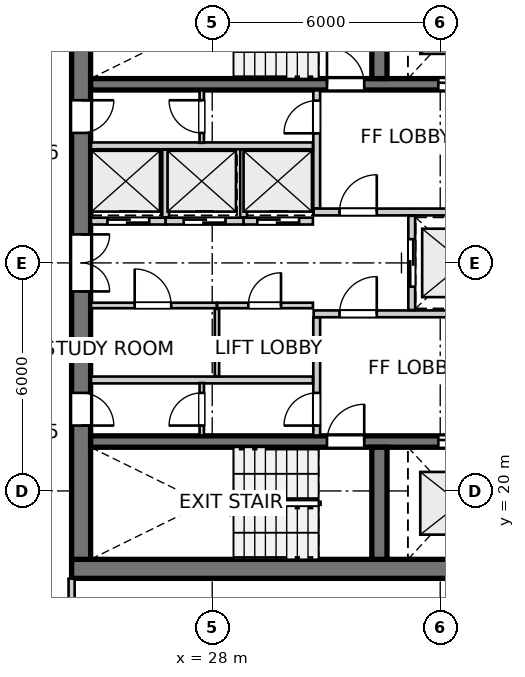
"""IFC4 building model, lengths in metres.
Left out: names, types, materials, properties, quantities, classifications, styles, units other than length and angle.
Written with IfcOpenShell. Run it as: python <this file> out.ifc"""

import sys

from ifc_helpers import new_model, si_unit, direction, frame, frame_2d, origin, place, context, subcontext, project, spatial, rectangle, extrude, source, transform, mapped, element, fill, save


model = new_model("IFC4")
c1 = context("Model", 3, precision=1e-05, world=origin(), true_north=direction((0.0, 1.0)))
c2 = subcontext(c1, "Body", "Model", "MODEL_VIEW")
j1 = project(units=[si_unit("LENGTHUNIT", "METRE"), si_unit("PLANEANGLEUNIT", "RADIAN")], contexts=[c1])
p1 = place(None, origin())
s1 = spatial("IfcSite", under=j1, at=p1, CompositionType="ELEMENT")
p2 = place(p1, origin())
s2 = spatial("IfcBuilding", under=s1, at=p2, CompositionType="ELEMENT")
p3 = place(p2, frame((0.0, 0.0, 208.4)))
s3 = spatial("IfcBuildingStorey", under=s2, at=p3, CompositionType="ELEMENT", Elevation=208.4)
p4 = place(p3, frame((24.3, 17.95, 0.0), z_axis=(0.0, 0.0, 1.0), x_axis=(1.0, 0.0, 0.0)))
e1 = element("IfcWall", 1, at=p4, inside=s3, PredefinedType="SHEAR", context=c2, shape_type="SweptSolid", body=[
    extrude(rectangle(XDim=12.1, YDim=0.5, at=frame_2d((6.05, 0.0))), origin(), (0.0, 0.0, 1.0), 2.935),
])
p5 = place(p3, frame((24.55, 33.8, 0.0), z_axis=(0.0, 0.0, 1.0), x_axis=(0.0, -1.0, 0.0)))
e2 = element("IfcWall", 2, at=p5, inside=s3, PredefinedType="SHEAR", context=c2, shape_type="SweptSolid", body=[
    extrude(rectangle(XDim=15.6, YDim=0.5, at=frame_2d((7.8, 0.0))), origin(), (0.0, 0.0, 1.0), 2.935),
])
p6 = place(p5, frame((7.05, 0.0, 0.0)))
e3 = element("IfcOpeningElement", 3, at=p6, cuts=e2, PredefinedType="OPENING", context=c2, shape_type="SweptSolid", body=[
    extrude(rectangle(XDim=1.5, YDim=2.15, at=frame_2d((0.75, 1.075))), frame((0.0, 0.26, 0.0), z_axis=(0.0, -1.0, 0.0), x_axis=(1.0, 0.0, 0.0)), (0.0, 0.0, 1.0), 0.52),
])
p7 = place(p5, frame((3.52, 0.0, 0.0)))
e4 = element("IfcOpeningElement", 4, at=p7, cuts=e2, PredefinedType="OPENING", context=c2, shape_type="SweptSolid", body=[
    extrude(rectangle(XDim=0.86, YDim=2.05, at=frame_2d((0.43, 1.025))), frame((0.0, 0.26, 0.0), z_axis=(0.0, -1.0, 0.0), x_axis=(1.0, 0.0, 0.0)), (0.0, 0.0, 1.0), 0.52),
])
p8 = place(p5, frame((11.22, 0.0, 0.0)))
e5 = element("IfcOpeningElement", 5, at=p8, cuts=e2, PredefinedType="OPENING", context=c2, shape_type="SweptSolid", body=[
    extrude(rectangle(XDim=0.86, YDim=2.05, at=frame_2d((0.43, 1.025))), frame((0.0, 0.26, 0.0), z_axis=(0.0, -1.0, 0.0), x_axis=(1.0, 0.0, 0.0)), (0.0, 0.0, 1.0), 0.52),
])
p9 = place(p3, frame((24.8, 21.3, 0.0), z_axis=(0.0, 0.0, 1.0), x_axis=(1.0, 0.0, 0.0)))
e6 = element("IfcWall", 6, at=p9, inside=s3, PredefinedType="SHEAR", context=c2, shape_type="SweptSolid", body=[
    extrude(rectangle(XDim=11.1, YDim=0.3, at=frame_2d((5.55, 0.0))), origin(), (0.0, 0.0, 1.0), 2.935),
])
p10 = place(p9, frame((6.22, 0.0, 0.0)))
e7 = element("IfcOpeningElement", 7, at=p10, cuts=e6, PredefinedType="OPENING", context=c2, shape_type="SweptSolid", body=[
    extrude(rectangle(XDim=0.98, YDim=2.15, at=frame_2d((0.49, 1.075))), frame((0.0, 0.16, 0.0), z_axis=(0.0, -1.0, 0.0), x_axis=(1.0, 0.0, 0.0)), (0.0, 0.0, 1.0), 0.32),
])
p11 = place(p9, frame((9.15, 0.0, 0.0)))
e8 = element("IfcOpeningElement", 8, at=p11, cuts=e6, PredefinedType="OPENING", context=c2, shape_type="SweptSolid", body=[
    extrude(rectangle(XDim=1.15, YDim=2.15, at=frame_2d((0.575, 1.075))), frame((0.0, 0.16, 0.0), z_axis=(0.0, -1.0, 0.0), x_axis=(1.0, 0.0, 0.0)), (0.0, 0.0, 1.0), 0.32),
])
p12 = place(p3, frame((32.4, 18.2, 0.0), z_axis=(0.0, 0.0, 1.0), x_axis=(0.0, 1.0, 0.0)))
e9 = element("IfcWall", 9, at=p12, inside=s3, PredefinedType="SHEAR", context=c2, shape_type="SweptSolid", body=[
    extrude(rectangle(XDim=2.95, YDim=0.4, at=frame_2d((1.475, 0.0))), origin(), (0.0, 0.0, 1.0), 2.935),
])
p13 = place(p3, frame((24.8, 30.7, 0.0), z_axis=(0.0, 0.0, 1.0), x_axis=(1.0, 0.0, 0.0)))
e10 = element("IfcWall", 10, at=p13, inside=s3, PredefinedType="SHEAR", context=c2, shape_type="SweptSolid", body=[
    extrude(rectangle(XDim=11.1, YDim=0.3, at=frame_2d((5.55, 0.0))), origin(), (0.0, 0.0, 1.0), 2.935),
])
p14 = place(p13, frame((6.22, 0.0, 0.0)))
e11 = element("IfcOpeningElement", 11, at=p14, cuts=e10, PredefinedType="OPENING", context=c2, shape_type="SweptSolid", body=[
    extrude(rectangle(XDim=0.98, YDim=2.15, at=frame_2d((0.49, 1.075))), frame((0.0, 0.16, 0.0), z_axis=(0.0, -1.0, 0.0), x_axis=(1.0, 0.0, 0.0)), (0.0, 0.0, 1.0), 0.32),
])
p15 = place(p13, frame((9.15, 0.0, 0.0)))
e12 = element("IfcOpeningElement", 12, at=p15, cuts=e10, PredefinedType="OPENING", context=c2, shape_type="SweptSolid", body=[
    extrude(rectangle(XDim=1.15, YDim=2.15, at=frame_2d((0.575, 1.075))), frame((0.0, 0.16, 0.0), z_axis=(0.0, -1.0, 0.0), x_axis=(1.0, 0.0, 0.0)), (0.0, 0.0, 1.0), 0.32),
])
p16 = place(p3, frame((32.4, 30.85, 0.0), z_axis=(0.0, 0.0, 1.0), x_axis=(0.0, 1.0, 0.0)))
e13 = element("IfcWall", 13, at=p16, inside=s3, PredefinedType="SHEAR", context=c2, shape_type="SweptSolid", body=[
    extrude(rectangle(XDim=2.95, YDim=0.4, at=frame_2d((1.475, 0.0))), origin(), (0.0, 0.0, 1.0), 2.935),
])
p17 = place(p3, frame((30.75, 21.46, 0.0), z_axis=(0.0, 0.0, 1.0), x_axis=(0.0, 1.0, 0.0)))
e14 = element("IfcWall", 14, at=p17, inside=s3, PredefinedType="PARTITIONING", context=c2, shape_type="SweptSolid", body=[
    extrude(rectangle(XDim=3.11, YDim=0.18, at=frame_2d((1.555, 0.0))), origin(), (0.0, 0.0, 1.0), 2.935),
])
p18 = place(p17, frame((0.26, 0.0, 0.0)))
e15 = element("IfcOpeningElement", 15, at=p18, cuts=e14, PredefinedType="OPENING", context=c2, shape_type="SweptSolid", body=[
    extrude(rectangle(XDim=0.86, YDim=2.05, at=frame_2d((0.43, 1.025))), frame((0.0, 0.1, 0.0), z_axis=(0.0, -1.0, 0.0), x_axis=(1.0, 0.0, 0.0)), (0.0, 0.0, 1.0), 0.2),
])
p19 = place(p3, frame((30.67, 24.66, 0.0), z_axis=(0.0, 0.0, 1.0), x_axis=(1.0, 0.0, 0.0)))
e16 = element("IfcWall", 16, at=p19, inside=s3, PredefinedType="PARTITIONING", context=c2, shape_type="SweptSolid", body=[
    extrude(rectangle(XDim=5.22, YDim=0.18, at=frame_2d((2.61, 0.0))), origin(), (0.0, 0.0, 1.0), 2.935),
])
p20 = place(p19, frame((0.68, 0.0, 0.0)))
e17 = element("IfcOpeningElement", 17, at=p20, cuts=e16, PredefinedType="OPENING", context=c2, shape_type="SweptSolid", body=[
    extrude(rectangle(XDim=0.98, YDim=2.15, at=frame_2d((0.49, 1.075))), frame((0.0, 0.1, 0.0), z_axis=(0.0, -1.0, 0.0), x_axis=(1.0, 0.0, 0.0)), (0.0, 0.0, 1.0), 0.2),
])
p21 = place(p3, frame((30.75, 27.43, 0.0), z_axis=(0.0, 0.0, 1.0), x_axis=(0.0, 1.0, 0.0)))
e18 = element("IfcWall", 18, at=p21, inside=s3, PredefinedType="PARTITIONING", context=c2, shape_type="SweptSolid", body=[
    extrude(rectangle(XDim=3.11, YDim=0.18, at=frame_2d((1.555, 0.0))), origin(), (0.0, 0.0, 1.0), 2.935),
])
p22 = place(p21, frame((1.98, 0.0, 0.0)))
e19 = element("IfcOpeningElement", 19, at=p22, cuts=e18, PredefinedType="OPENING", context=c2, shape_type="SweptSolid", body=[
    extrude(rectangle(XDim=0.86, YDim=2.05, at=frame_2d((0.43, 1.025))), frame((0.0, 0.1, 0.0), z_axis=(0.0, -1.0, 0.0), x_axis=(1.0, 0.0, 0.0)), (0.0, 0.0, 1.0), 0.2),
])
p23 = place(p3, frame((30.67, 27.34, 0.0), z_axis=(0.0, 0.0, 1.0), x_axis=(1.0, 0.0, 0.0)))
e20 = element("IfcWall", 20, at=p23, inside=s3, PredefinedType="PARTITIONING", context=c2, shape_type="SweptSolid", body=[
    extrude(rectangle(XDim=5.22, YDim=0.18, at=frame_2d((2.61, 0.0))), origin(), (0.0, 0.0, 1.0), 2.935),
])
p24 = place(p23, frame((0.68, 0.0, 0.0)))
e21 = element("IfcOpeningElement", 21, at=p24, cuts=e20, PredefinedType="OPENING", context=c2, shape_type="SweptSolid", body=[
    extrude(rectangle(XDim=0.98, YDim=2.15, at=frame_2d((0.49, 1.075))), frame((0.0, 0.1, 0.0), z_axis=(0.0, -1.0, 0.0), x_axis=(1.0, 0.0, 0.0)), (0.0, 0.0, 1.0), 0.2),
])
p25 = place(p3, frame((33.25, 24.76, 0.0), z_axis=(0.0, 0.0, 1.0), x_axis=(0.0, 1.0, 0.0)))
e22 = element("IfcWall", 22, at=p25, inside=s3, PredefinedType="PARTITIONING", context=c2, shape_type="SweptSolid", body=[
    extrude(rectangle(XDim=2.48, YDim=0.18, at=frame_2d((1.24, 0.0))), origin(), (0.0, 0.0, 1.0), 2.935),
])
p26 = place(p25, frame((0.615, 0.0, 0.0)))
e23 = element("IfcOpeningElement", 23, at=p26, cuts=e22, PredefinedType="OPENING", context=c2, shape_type="SweptSolid", body=[
    extrude(rectangle(XDim=1.25, YDim=2.15, at=frame_2d((0.625, 1.075))), frame((0.0, 0.1, 0.0), z_axis=(0.0, -1.0, 0.0), x_axis=(1.0, 0.0, 0.0)), (0.0, 0.0, 1.0), 0.2),
])
p27 = place(p3, frame((24.81, 22.92, 0.0), z_axis=(0.0, 0.0, 1.0), x_axis=(1.0, 0.0, 0.0)))
e24 = element("IfcWall", 24, at=p27, inside=s3, PredefinedType="PARTITIONING", context=c2, shape_type="SweptSolid", body=[
    extrude(rectangle(XDim=5.84, YDim=0.18, at=frame_2d((2.92, 0.0))), origin(), (0.0, 0.0, 1.0), 2.935),
])
p28 = place(p3, frame((24.81, 24.88, 0.0), z_axis=(0.0, 0.0, 1.0), x_axis=(1.0, 0.0, 0.0)))
e25 = element("IfcWall", 25, at=p28, inside=s3, PredefinedType="PARTITIONING", context=c2, shape_type="SweptSolid", body=[
    extrude(rectangle(XDim=3.31, YDim=0.145, at=frame_2d((1.655, 0.0))), origin(), (0.0, 0.0, 1.0), 2.935),
])
p29 = place(p28, frame((1.15, 0.0, 0.0)))
e26 = element("IfcOpeningElement", 26, at=p29, cuts=e25, PredefinedType="OPENING", context=c2, shape_type="SweptSolid", body=[
    extrude(rectangle(XDim=0.96, YDim=2.1, at=frame_2d((0.48, 1.05))), frame((0.0, 0.083, 0.0), z_axis=(0.0, -1.0, 0.0), x_axis=(1.0, 0.0, 0.0)), (0.0, 0.0, 1.0), 0.165),
])
p30 = place(p3, frame((28.13, 24.88, 0.0), z_axis=(0.0, 0.0, 1.0), x_axis=(1.0, 0.0, 0.0)))
e27 = element("IfcWall", 27, at=p30, inside=s3, PredefinedType="PARTITIONING", context=c2, shape_type="SweptSolid", body=[
    extrude(rectangle(XDim=2.52, YDim=0.145, at=frame_2d((1.26, 0.0))), origin(), (0.0, 0.0, 1.0), 2.935),
])
p31 = place(p30, frame((0.82, 0.0, 0.0)))
e28 = element("IfcOpeningElement", 28, at=p31, cuts=e27, PredefinedType="OPENING", context=c2, shape_type="SweptSolid", body=[
    extrude(rectangle(XDim=0.86, YDim=2.05, at=frame_2d((0.43, 1.025))), frame((0.0, 0.083, 0.0), z_axis=(0.0, -1.0, 0.0), x_axis=(1.0, 0.0, 0.0)), (0.0, 0.0, 1.0), 0.165),
])
p32 = place(p3, frame((28.125, 23.02, 0.0), z_axis=(0.0, 0.0, 1.0), x_axis=(0.0, 1.0, 0.0)))
e29 = element("IfcWall", 29, at=p32, inside=s3, PredefinedType="PARTITIONING", context=c2, shape_type="SweptSolid", body=[
    extrude(rectangle(XDim=1.77, YDim=0.115, at=frame_2d((0.885, 0.0))), origin(), (0.0, 0.0, 1.0), 2.935),
])
p33 = place(p3, frame((24.81, 29.08, 0.0), z_axis=(0.0, 0.0, 1.0), x_axis=(1.0, 0.0, 0.0)))
e30 = element("IfcWall", 30, at=p33, inside=s3, PredefinedType="PARTITIONING", context=c2, shape_type="SweptSolid", body=[
    extrude(rectangle(XDim=5.84, YDim=0.18, at=frame_2d((2.92, 0.0))), origin(), (0.0, 0.0, 1.0), 2.935),
])
p34 = place(p3, frame((24.81, 27.1, 0.0), z_axis=(0.0, 0.0, 1.0), x_axis=(1.0, 0.0, 0.0)))
e31 = element("IfcWall", 31, at=p34, inside=s3, PredefinedType="PARTITIONING", context=c2, shape_type="SweptSolid", body=[
    extrude(rectangle(XDim=1.965, YDim=0.18, at=frame_2d((0.982, 0.0))), origin(), (0.0, 0.0, 1.0), 2.935),
])
p35 = place(p34, frame((0.433, 0.0, 0.0)))
e32 = element("IfcOpeningElement", 32, at=p35, cuts=e31, PredefinedType="OPENING", context=c2, shape_type="SweptSolid", body=[
    extrude(rectangle(XDim=1.1, YDim=2.15, at=frame_2d((0.55, 1.075))), frame((0.0, 0.1, 0.0), z_axis=(0.0, -1.0, 0.0), x_axis=(1.0, 0.0, 0.0)), (0.0, 0.0, 1.0), 0.2),
])
p36 = place(p3, frame((26.775, 27.1, 0.0), z_axis=(0.0, 0.0, 1.0), x_axis=(1.0, 0.0, 0.0)))
e33 = element("IfcWall", 33, at=p36, inside=s3, PredefinedType="PARTITIONING", context=c2, shape_type="SweptSolid", body=[
    extrude(rectangle(XDim=2.05, YDim=0.18, at=frame_2d((1.025, 0.0))), origin(), (0.0, 0.0, 1.0), 2.935),
])
p37 = place(p36, frame((0.475, 0.0, 0.0)))
e34 = element("IfcOpeningElement", 34, at=p37, cuts=e33, PredefinedType="OPENING", context=c2, shape_type="SweptSolid", body=[
    extrude(rectangle(XDim=1.1, YDim=2.15, at=frame_2d((0.55, 1.075))), frame((0.0, 0.1, 0.0), z_axis=(0.0, -1.0, 0.0), x_axis=(1.0, 0.0, 0.0)), (0.0, 0.0, 1.0), 0.2),
])
p38 = place(p3, frame((26.775, 27.2, 0.0), z_axis=(0.0, 0.0, 1.0), x_axis=(0.0, 1.0, 0.0)))
e35 = element("IfcWall", 35, at=p38, inside=s3, PredefinedType="PARTITIONING", context=c2, shape_type="SweptSolid", body=[
    extrude(rectangle(XDim=1.78, YDim=0.18, at=frame_2d((0.89, 0.0))), origin(), (0.0, 0.0, 1.0), 2.935),
])
p39 = place(p3, frame((28.825, 27.1, 0.0), z_axis=(0.0, 0.0, 1.0), x_axis=(1.0, 0.0, 0.0)))
e36 = element("IfcWall", 36, at=p39, inside=s3, PredefinedType="PARTITIONING", context=c2, shape_type="SweptSolid", body=[
    extrude(rectangle(XDim=1.825, YDim=0.18, at=frame_2d((0.913, 0.0))), origin(), (0.0, 0.0, 1.0), 2.935),
])
p40 = place(p39, frame((0.363, 0.0, 0.0)))
e37 = element("IfcOpeningElement", 37, at=p40, cuts=e36, PredefinedType="OPENING", context=c2, shape_type="SweptSolid", body=[
    extrude(rectangle(XDim=1.1, YDim=2.15, at=frame_2d((0.55, 1.075))), frame((0.0, 0.1, 0.0), z_axis=(0.0, -1.0, 0.0), x_axis=(1.0, 0.0, 0.0)), (0.0, 0.0, 1.0), 0.2),
])
p41 = place(p3, frame((28.825, 27.2, 0.0), z_axis=(0.0, 0.0, 1.0), x_axis=(0.0, 1.0, 0.0)))
e38 = element("IfcWall", 38, at=p41, inside=s3, PredefinedType="PARTITIONING", context=c2, shape_type="SweptSolid", body=[
    extrude(rectangle(XDim=1.78, YDim=0.18, at=frame_2d((0.89, 0.0))), origin(), (0.0, 0.0, 1.0), 2.935),
])
p42 = place(p3, frame((27.725, 21.46, 0.0), z_axis=(0.0, 0.0, 1.0), x_axis=(0.0, 1.0, 0.0)))
e39 = element("IfcWall", 39, at=p42, inside=s3, PredefinedType="PARTITIONING", context=c2, shape_type="SweptSolid", body=[
    extrude(rectangle(XDim=1.38, YDim=0.115, at=frame_2d((0.69, 0.0))), origin(), (0.0, 0.0, 1.0), 2.935),
])
p43 = place(p42, frame((0.26, 0.0, 0.0)))
e40 = element("IfcOpeningElement", 40, at=p43, cuts=e39, PredefinedType="OPENING", context=c2, shape_type="SweptSolid", body=[
    extrude(rectangle(XDim=0.86, YDim=2.05, at=frame_2d((0.43, 1.025))), frame((0.0, 0.067, 0.0), z_axis=(0.0, -1.0, 0.0), x_axis=(1.0, 0.0, 0.0)), (0.0, 0.0, 1.0), 0.135),
])
p44 = place(p3, frame((27.725, 29.16, 0.0), z_axis=(0.0, 0.0, 1.0), x_axis=(0.0, 1.0, 0.0)))
e41 = element("IfcWall", 41, at=p44, inside=s3, PredefinedType="PARTITIONING", context=c2, shape_type="SweptSolid", body=[
    extrude(rectangle(XDim=1.38, YDim=0.115, at=frame_2d((0.69, 0.0))), origin(), (0.0, 0.0, 1.0), 2.935),
])
p45 = place(p44, frame((0.26, 0.0, 0.0)))
e42 = element("IfcOpeningElement", 42, at=p45, cuts=e41, PredefinedType="OPENING", context=c2, shape_type="SweptSolid", body=[
    extrude(rectangle(XDim=0.86, YDim=2.05, at=frame_2d((0.43, 1.025))), frame((0.0, 0.067, 0.0), z_axis=(0.0, -1.0, 0.0), x_axis=(1.0, 0.0, 0.0)), (0.0, 0.0, 1.0), 0.135),
])
p46 = place(p3, frame((24.3, 15.002, 0.0), z_axis=(0.0, 0.0, 1.0), x_axis=(0.0, 1.0, 0.0)))
e43 = element("IfcWall", 43, at=p46, inside=s3, PredefinedType="PARTITIONING", context=c2, shape_type="SweptSolid", body=[
    extrude(rectangle(XDim=2.69, YDim=0.16, at=frame_2d((1.345, 0.0))), origin(), (0.0, 0.0, 1.0), 2.935),
])
m1 = source(origin(), c2, "Body", "SweptSolid", [
    extrude(rectangle(XDim=0.98, YDim=2.15, at=frame_2d((0.49, 1.075))), frame((0.0, 0.025, 0.0), z_axis=(0.0, -1.0, 0.0), x_axis=(1.0, 0.0, 0.0)), (0.0, 0.0, 1.0), 0.05),
])
p47 = place(p10, origin())
e44 = element("IfcDoor", 44, at=p47, inside=s3, OperationType="SINGLE_SWING_RIGHT", PredefinedType="DOOR", context=c2, shape_type="MappedRepresentation", body=[
    mapped(m1, transform((0.0, 0.0, 0.0), x_axis=(1.0, 0.0, 0.0), y_axis=(0.0, 1.0, 0.0), z_axis=(0.0, 0.0, 1.0), scale=1.0)),
])
fill(e7, e44)
m2 = source(origin(), c2, "Body", "SweptSolid", [
    extrude(rectangle(XDim=1.15, YDim=2.15, at=frame_2d((0.575, 1.075))), frame((0.0, 0.025, 0.0), z_axis=(0.0, -1.0, 0.0), x_axis=(1.0, 0.0, 0.0)), (0.0, 0.0, 1.0), 0.05),
])
p48 = place(p11, origin())
e45 = element("IfcDoor", 45, at=p48, inside=s3, OperationType="DOUBLE_DOOR_SLIDING", PredefinedType="DOOR", context=c2, shape_type="MappedRepresentation", body=[
    mapped(m2, transform((0.0, 0.0, 0.0), x_axis=(1.0, 0.0, 0.0), y_axis=(0.0, 1.0, 0.0), z_axis=(0.0, 0.0, 1.0), scale=1.0)),
])
fill(e8, e45)
p49 = place(p14, origin())
e46 = element("IfcDoor", 46, at=p49, inside=s3, OperationType="SINGLE_SWING_LEFT", PredefinedType="DOOR", context=c2, shape_type="MappedRepresentation", body=[
    mapped(m1, transform((0.0, 0.0, 0.0), x_axis=(1.0, 0.0, 0.0), y_axis=(0.0, 1.0, 0.0), z_axis=(0.0, 0.0, 1.0), scale=1.0)),
])
fill(e11, e46)
p50 = place(p15, origin())
e47 = element("IfcDoor", 47, at=p50, inside=s3, OperationType="DOUBLE_DOOR_SLIDING", PredefinedType="DOOR", context=c2, shape_type="MappedRepresentation", body=[
    mapped(m2, transform((0.0, 0.0, 0.0), x_axis=(1.0, 0.0, 0.0), y_axis=(0.0, 1.0, 0.0), z_axis=(0.0, 0.0, 1.0), scale=1.0)),
])
fill(e12, e47)
m3 = source(origin(), c2, "Body", "SweptSolid", [
    extrude(rectangle(XDim=1.5, YDim=2.15, at=frame_2d((0.75, 1.075))), frame((0.0, 0.025, 0.0), z_axis=(0.0, -1.0, 0.0), x_axis=(1.0, 0.0, 0.0)), (0.0, 0.0, 1.0), 0.05),
])
p51 = place(p6, origin())
e48 = element("IfcDoor", 48, at=p51, inside=s3, OperationType="DOUBLE_DOOR_SINGLE_SWING", PredefinedType="DOOR", context=c2, shape_type="MappedRepresentation", body=[
    mapped(m3, transform((0.0, 0.0, 0.0), x_axis=(1.0, 0.0, 0.0), y_axis=(0.0, 1.0, 0.0), z_axis=(0.0, 0.0, 1.0), scale=1.0)),
])
fill(e3, e48)
m4 = source(origin(), c2, "Body", "SweptSolid", [
    extrude(rectangle(XDim=0.86, YDim=2.05, at=frame_2d((0.43, 1.025))), frame((0.0, 0.025, 0.0), z_axis=(0.0, -1.0, 0.0), x_axis=(1.0, 0.0, 0.0)), (0.0, 0.0, 1.0), 0.05),
])
p52 = place(p7, origin())
e49 = element("IfcDoor", 49, at=p52, inside=s3, OperationType="SINGLE_SWING_LEFT", PredefinedType="DOOR", context=c2, shape_type="MappedRepresentation", body=[
    mapped(m4, transform((0.0, 0.0, 0.0), x_axis=(1.0, 0.0, 0.0), y_axis=(0.0, 1.0, 0.0), z_axis=(0.0, 0.0, 1.0), scale=1.0)),
])
fill(e4, e49)
p53 = place(p8, origin())
e50 = element("IfcDoor", 50, at=p53, inside=s3, OperationType="SINGLE_SWING_RIGHT", PredefinedType="DOOR", context=c2, shape_type="MappedRepresentation", body=[
    mapped(m4, transform((0.0, 0.0, 0.0), x_axis=(1.0, 0.0, 0.0), y_axis=(0.0, 1.0, 0.0), z_axis=(0.0, 0.0, 1.0), scale=1.0)),
])
fill(e5, e50)
p54 = place(p18, origin())
e51 = element("IfcDoor", 51, at=p54, inside=s3, OperationType="SINGLE_SWING_LEFT", PredefinedType="DOOR", context=c2, shape_type="MappedRepresentation", body=[
    mapped(m4, transform((0.0, 0.0, 0.0), x_axis=(1.0, 0.0, 0.0), y_axis=(0.0, 1.0, 0.0), z_axis=(0.0, 0.0, 1.0), scale=1.0)),
])
fill(e15, e51)
p55 = place(p20, origin())
e52 = element("IfcDoor", 52, at=p55, inside=s3, OperationType="SINGLE_SWING_RIGHT", PredefinedType="DOOR", context=c2, shape_type="MappedRepresentation", body=[
    mapped(m1, transform((0.0, 0.0, 0.0), x_axis=(1.0, 0.0, 0.0), y_axis=(0.0, 1.0, 0.0), z_axis=(0.0, 0.0, 1.0), scale=1.0)),
])
fill(e17, e52)
p56 = place(p22, origin())
e53 = element("IfcDoor", 53, at=p56, inside=s3, OperationType="SINGLE_SWING_LEFT", PredefinedType="DOOR", context=c2, shape_type="MappedRepresentation", body=[
    mapped(m4, transform((0.0, 0.0, 0.0), x_axis=(1.0, 0.0, 0.0), y_axis=(0.0, 1.0, 0.0), z_axis=(0.0, 0.0, 1.0), scale=1.0)),
])
fill(e19, e53)
p57 = place(p24, origin())
e54 = element("IfcDoor", 54, at=p57, inside=s3, OperationType="SINGLE_SWING_RIGHT", PredefinedType="DOOR", context=c2, shape_type="MappedRepresentation", body=[
    mapped(m1, transform((0.0, 0.0, 0.0), x_axis=(1.0, 0.0, 0.0), y_axis=(0.0, 1.0, 0.0), z_axis=(0.0, 0.0, 1.0), scale=1.0)),
])
fill(e21, e54)
m5 = source(origin(), c2, "Body", "SweptSolid", [
    extrude(rectangle(XDim=1.25, YDim=2.15, at=frame_2d((0.625, 1.075))), frame((0.0, 0.025, 0.0), z_axis=(0.0, -1.0, 0.0), x_axis=(1.0, 0.0, 0.0)), (0.0, 0.0, 1.0), 0.05),
])
p58 = place(p26, origin())
e55 = element("IfcDoor", 55, at=p58, inside=s3, OperationType="DOUBLE_DOOR_SLIDING", PredefinedType="DOOR", context=c2, shape_type="MappedRepresentation", body=[
    mapped(m5, transform((0.0, 0.0, 0.0), x_axis=(1.0, 0.0, 0.0), y_axis=(0.0, 1.0, 0.0), z_axis=(0.0, 0.0, 1.0), scale=1.0)),
])
fill(e23, e55)
m6 = source(origin(), c2, "Body", "SweptSolid", [
    extrude(rectangle(XDim=0.96, YDim=2.1, at=frame_2d((0.48, 1.05))), frame((0.0, 0.025, 0.0), z_axis=(0.0, -1.0, 0.0), x_axis=(1.0, 0.0, 0.0)), (0.0, 0.0, 1.0), 0.05),
])
p59 = place(p29, origin())
e56 = element("IfcDoor", 56, at=p59, inside=s3, OperationType="SINGLE_SWING_LEFT", PredefinedType="DOOR", context=c2, shape_type="MappedRepresentation", body=[
    mapped(m6, transform((0.0, 0.0, 0.0), x_axis=(1.0, 0.0, 0.0), y_axis=(0.0, 1.0, 0.0), z_axis=(0.0, 0.0, 1.0), scale=1.0)),
])
fill(e26, e56)
p60 = place(p31, origin())
e57 = element("IfcDoor", 57, at=p60, inside=s3, OperationType="SINGLE_SWING_RIGHT", PredefinedType="DOOR", context=c2, shape_type="MappedRepresentation", body=[
    mapped(m4, transform((0.0, 0.0, 0.0), x_axis=(1.0, 0.0, 0.0), y_axis=(0.0, 1.0, 0.0), z_axis=(0.0, 0.0, 1.0), scale=1.0)),
])
fill(e28, e57)
m7 = source(origin(), c2, "Body", "SweptSolid", [
    extrude(rectangle(XDim=1.1, YDim=2.15, at=frame_2d((0.55, 1.075))), frame((0.0, 0.025, 0.0), z_axis=(0.0, -1.0, 0.0), x_axis=(1.0, 0.0, 0.0)), (0.0, 0.0, 1.0), 0.05),
])
p61 = place(p35, origin())
e58 = element("IfcDoor", 58, at=p61, inside=s3, OperationType="DOUBLE_DOOR_SLIDING", PredefinedType="DOOR", context=c2, shape_type="MappedRepresentation", body=[
    mapped(m7, transform((0.0, 0.0, 0.0), x_axis=(1.0, 0.0, 0.0), y_axis=(0.0, 1.0, 0.0), z_axis=(0.0, 0.0, 1.0), scale=1.0)),
])
fill(e32, e58)
p62 = place(p37, origin())
e59 = element("IfcDoor", 59, at=p62, inside=s3, OperationType="DOUBLE_DOOR_SLIDING", PredefinedType="DOOR", context=c2, shape_type="MappedRepresentation", body=[
    mapped(m7, transform((0.0, 0.0, 0.0), x_axis=(1.0, 0.0, 0.0), y_axis=(0.0, 1.0, 0.0), z_axis=(0.0, 0.0, 1.0), scale=1.0)),
])
fill(e34, e59)
p63 = place(p40, origin())
e60 = element("IfcDoor", 60, at=p63, inside=s3, OperationType="DOUBLE_DOOR_SLIDING", PredefinedType="DOOR", context=c2, shape_type="MappedRepresentation", body=[
    mapped(m7, transform((0.0, 0.0, 0.0), x_axis=(1.0, 0.0, 0.0), y_axis=(0.0, 1.0, 0.0), z_axis=(0.0, 0.0, 1.0), scale=1.0)),
])
fill(e37, e60)
p64 = place(p43, origin())
e61 = element("IfcDoor", 61, at=p64, inside=s3, OperationType="SINGLE_SWING_LEFT", PredefinedType="DOOR", context=c2, shape_type="MappedRepresentation", body=[
    mapped(m4, transform((0.0, 0.0, 0.0), x_axis=(1.0, 0.0, 0.0), y_axis=(0.0, 1.0, 0.0), z_axis=(0.0, 0.0, 1.0), scale=1.0)),
])
fill(e40, e61)
p65 = place(p45, origin())
e62 = element("IfcDoor", 62, at=p65, inside=s3, OperationType="SINGLE_SWING_RIGHT", PredefinedType="DOOR", context=c2, shape_type="MappedRepresentation", body=[
    mapped(m4, transform((0.0, 0.0, 0.0), x_axis=(1.0, 0.0, 0.0), y_axis=(0.0, 1.0, 0.0), z_axis=(0.0, 0.0, 1.0), scale=1.0)),
])
fill(e42, e62)
save(model, sys.argv[1])
